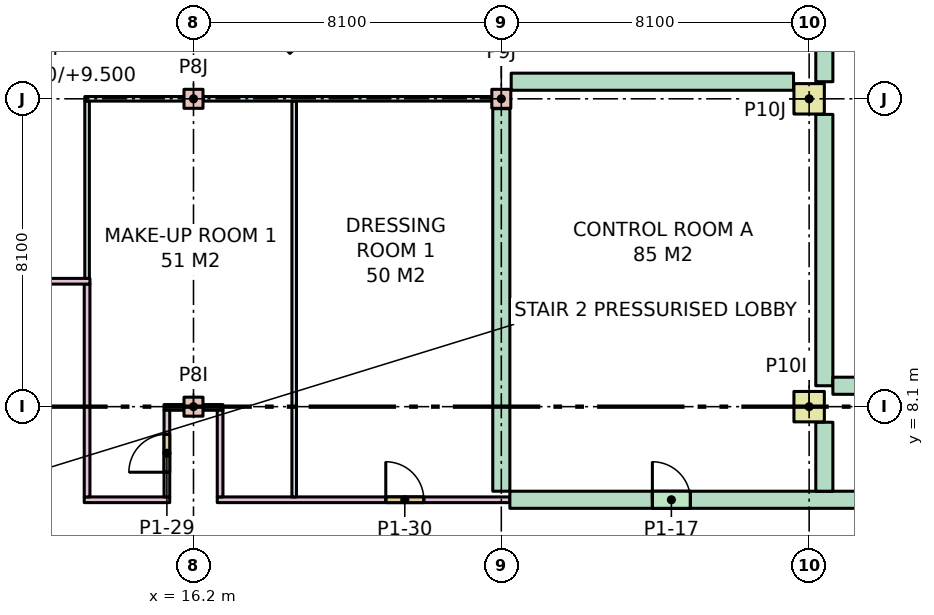
"""IFC4 building model, lengths in metres.
Left out: names, types, materials, properties, quantities, classifications, styles, units other than length and angle.
Written with IfcOpenShell. Run it as: python <this file> out.ifc"""

import sys

from ifc_helpers import new_model, si_unit, direction, frame, frame_2d, origin, origin_2d, place, context, subcontext, project, spatial, rectangle, extrude, element, fill, save


model = new_model("IFC4")
c1 = context("Model", 3, precision=1e-05, world=origin(), true_north=direction((0.0, 1.0)))
c2 = subcontext(c1, "Body", "Model", "MODEL_VIEW")
j1 = project(units=[si_unit("LENGTHUNIT", "METRE"), si_unit("PLANEANGLEUNIT", "RADIAN")], contexts=[c1])
p1 = place(None, origin())
s1 = spatial("IfcSite", under=j1, at=p1, CompositionType="ELEMENT")
p2 = place(p1, origin())
s2 = spatial("IfcBuilding", under=s1, at=p2, CompositionType="ELEMENT")
p3 = place(p2, frame((0.0, 0.0, 6.0)))
s3 = spatial("IfcBuildingStorey", under=s2, at=p3, CompositionType="ELEMENT", Elevation=6.0)
for number, where, z_axis, x_axis in (
    (1, (16.2, 8.1, 0.0), (0.0, 0.0, 1.0), (1.0, 0.0, 0.0)),
    (2, (16.2, 16.2, 0.0), (0.0, 0.0, 1.0), (1.0, 0.0, 0.0)),
    (3, (24.3, 16.2, 0.0), (0.0, 0.0, 1.0), (1.0, 0.0, 0.0)),
):
    element("IfcColumn", number, at=place(p3, frame(where, z_axis=z_axis, x_axis=x_axis)), inside=s3, PredefinedType="COLUMN", context=c2, shape_type="SweptSolid", body=[
        extrude(rectangle(XDim=0.5, YDim=0.5, at=origin_2d()), origin(), (0.0, 0.0, 1.0), 7.0),
    ])
for number, where, z_axis, x_axis in (
    (4, (32.4, 8.1, 0.0), (0.0, 0.0, 1.0), (1.0, 0.0, 0.0)),
    (5, (32.4, 16.2, 0.0), (0.0, 0.0, 1.0), (1.0, 0.0, 0.0)),
):
    element("IfcColumn", number, at=place(p3, frame(where, z_axis=z_axis, x_axis=x_axis)), inside=s3, PredefinedType="COLUMN", context=c2, shape_type="SweptSolid", body=[
        extrude(rectangle(XDim=0.8, YDim=0.8, at=origin_2d()), origin(), (0.0, 0.0, 1.0), 7.0),
    ])
p4 = place(p3, frame((18.738, 18.738, 0.0), z_axis=(0.0, 0.0, 1.0), x_axis=(-0.707106781187, 0.707106781187, 0.0)))
e6 = element("IfcColumn", 6, at=p4, inside=s3, PredefinedType="COLUMN", context=c2, shape_type="SweptSolid", body=[
    extrude(rectangle(XDim=1.9, YDim=1.9, at=origin_2d()), origin(), (0.0, 0.0, 1.0), 7.0),
])
p5 = place(p3, frame((24.3, 5.875, 0.0), z_axis=(0.0, 0.0, 1.0), x_axis=(0.0, 1.0, 0.0)))
e7 = element("IfcWall", 7, at=p5, inside=s3, PredefinedType="PARTITIONING", context=c2, shape_type="SweptSolid", body=[
    extrude(rectangle(XDim=10.065, YDim=0.45, at=frame_2d((5.032, 0.0))), origin(), (0.0, 0.0, 1.0), 6.68),
])
p6 = place(p3, frame((24.525, 5.65, 0.0), z_axis=(0.0, 0.0, 1.0), x_axis=(1.0, 0.0, 0.0)))
e8 = element("IfcWall", 8, at=p6, inside=s3, PredefinedType="PARTITIONING", context=c2, shape_type="SweptSolid", body=[
    extrude(rectangle(XDim=11.7, YDim=0.45, at=frame_2d((5.85, 0.0))), origin(), (0.0, 0.0, 1.0), 6.68),
])
p7 = place(p6, frame((9.65, 0.0, 0.0)))
e9 = element("IfcOpeningElement", 9, at=p7, cuts=e8, PredefinedType="OPENING", context=c2, shape_type="SweptSolid", body=[
    extrude(rectangle(XDim=1.0, YDim=2.1, at=frame_2d((0.5, 1.05))), frame((0.0, 0.235, 0.0), z_axis=(0.0, -1.0, 0.0), x_axis=(1.0, 0.0, 0.0)), (0.0, 0.0, 1.0), 0.47),
])
p8 = place(p6, frame((3.75, 0.0, 0.0)))
e10 = element("IfcOpeningElement", 10, at=p8, cuts=e8, PredefinedType="OPENING", context=c2, shape_type="SweptSolid", body=[
    extrude(rectangle(XDim=1.0, YDim=2.1, at=frame_2d((0.5, 1.05))), frame((0.0, 0.235, 0.0), z_axis=(0.0, -1.0, 0.0), x_axis=(1.0, 0.0, 0.0)), (0.0, 0.0, 1.0), 0.47),
])
p9 = place(p3, frame((32.8, 5.875, 0.0), z_axis=(0.0, 0.0, 1.0), x_axis=(0.0, 1.0, 0.0)))
e11 = element("IfcWall", 11, at=p9, inside=s3, PredefinedType="PARTITIONING", context=c2, shape_type="SweptSolid", body=[
    extrude(rectangle(XDim=1.815, YDim=0.45, at=frame_2d((0.907, 0.0))), origin(), (0.0, 0.0, 1.0), 6.68),
])
p10 = place(p3, frame((24.56, 16.65, 0.0), z_axis=(0.0, 0.0, 1.0), x_axis=(1.0, 0.0, 0.0)))
e12 = element("IfcWall", 12, at=p10, inside=s3, PredefinedType="PARTITIONING", context=c2, shape_type="SweptSolid", body=[
    extrude(rectangle(XDim=7.43, YDim=0.45, at=frame_2d((3.715, 0.0))), origin(), (0.0, 0.0, 1.0), 6.68),
])
p11 = place(p3, frame((32.8, 8.65, 0.0), z_axis=(0.0, 0.0, 1.0), x_axis=(0.0, 1.0, 0.0)))
e13 = element("IfcWall", 13, at=p11, inside=s3, PredefinedType="PARTITIONING", context=c2, shape_type="SweptSolid", body=[
    extrude(rectangle(XDim=7.14, YDim=0.45, at=frame_2d((3.57, 0.0))), origin(), (0.0, 0.0, 1.0), 6.68),
])
p12 = place(p3, frame((18.85, 5.725, 0.0), z_axis=(0.0, 0.0, 1.0), x_axis=(0.0, 1.0, 0.0)))
e14 = element("IfcWall", 14, at=p12, inside=s3, PredefinedType="PARTITIONING", context=c2, shape_type="SweptSolid", body=[
    extrude(rectangle(XDim=10.415, YDim=0.12, at=frame_2d((5.208, 0.0))), origin(), (0.0, 0.0, 1.0), 6.68),
])
p13 = place(p3, frame((13.325, 5.65, 0.0), z_axis=(0.0, 0.0, 1.0), x_axis=(1.0, 0.0, 0.0)))
e15 = element("IfcWall", 15, at=p13, inside=s3, PredefinedType="PARTITIONING", context=c2, shape_type="SweptSolid", body=[
    extrude(rectangle(XDim=2.25, YDim=0.15, at=frame_2d((1.125, 0.0))), origin(), (0.0, 0.0, 1.0), 6.68),
])
p14 = place(p3, frame((16.825, 5.65, 0.0), z_axis=(0.0, 0.0, 1.0), x_axis=(1.0, 0.0, 0.0)))
e16 = element("IfcWall", 16, at=p14, inside=s3, PredefinedType="PARTITIONING", context=c2, shape_type="SweptSolid", body=[
    extrude(rectangle(XDim=7.7, YDim=0.15, at=frame_2d((3.85, 0.0))), origin(), (0.0, 0.0, 1.0), 6.68),
])
p15 = place(p14, frame((4.435, 0.0, 0.0)))
e17 = element("IfcOpeningElement", 17, at=p15, cuts=e16, PredefinedType="OPENING", context=c2, shape_type="SweptSolid", body=[
    extrude(rectangle(XDim=1.0, YDim=2.1, at=frame_2d((0.5, 1.05))), frame((0.0, 0.085, 0.0), z_axis=(0.0, -1.0, 0.0), x_axis=(1.0, 0.0, 0.0)), (0.0, 0.0, 1.0), 0.17),
])
p16 = place(p3, frame((15.425, 8.08, 0.0), z_axis=(0.0, 0.0, 1.0), x_axis=(1.0, 0.0, 0.0)))
e18 = element("IfcWall", 18, at=p16, inside=s3, PredefinedType="PARTITIONING", context=c2, shape_type="SweptSolid", body=[
    extrude(rectangle(XDim=0.515, YDim=0.15, at=frame_2d((0.257, 0.0))), origin(), (0.0, 0.0, 1.0), 6.68),
])
p17 = place(p3, frame((16.46, 8.08, 0.0), z_axis=(0.0, 0.0, 1.0), x_axis=(1.0, 0.0, 0.0)))
e19 = element("IfcWall", 19, at=p17, inside=s3, PredefinedType="PARTITIONING", context=c2, shape_type="SweptSolid", body=[
    extrude(rectangle(XDim=0.515, YDim=0.15, at=frame_2d((0.258, 0.0))), origin(), (0.0, 0.0, 1.0), 6.68),
])
p18 = place(p3, frame((15.5, 5.725, 0.0), z_axis=(0.0, 0.0, 1.0), x_axis=(0.0, 1.0, 0.0)))
e20 = element("IfcWall", 20, at=p18, inside=s3, PredefinedType="PARTITIONING", context=c2, shape_type="SweptSolid", body=[
    extrude(rectangle(XDim=2.28, YDim=0.15, at=frame_2d((1.14, 0.0))), origin(), (0.0, 0.0, 1.0), 6.68),
])
p19 = place(p18, frame((0.65, 0.0, 0.0)))
e21 = element("IfcOpeningElement", 21, at=p19, cuts=e20, PredefinedType="OPENING", context=c2, shape_type="SweptSolid", body=[
    extrude(rectangle(XDim=1.0, YDim=2.1, at=frame_2d((0.5, 1.05))), frame((0.0, 0.085, 0.0), z_axis=(0.0, -1.0, 0.0), x_axis=(1.0, 0.0, 0.0)), (0.0, 0.0, 1.0), 0.17),
])
p20 = place(p3, frame((16.9, 5.725, 0.0), z_axis=(0.0, 0.0, 1.0), x_axis=(0.0, 1.0, 0.0)))
e22 = element("IfcWall", 22, at=p20, inside=s3, PredefinedType="PARTITIONING", context=c2, shape_type="SweptSolid", body=[
    extrude(rectangle(XDim=2.28, YDim=0.15, at=frame_2d((1.14, 0.0))), origin(), (0.0, 0.0, 1.0), 6.68),
])
p21 = place(p3, frame((33.025, 8.65, 0.0), z_axis=(0.0, 0.0, 1.0), x_axis=(1.0, 0.0, 0.0)))
e23 = element("IfcWall", 23, at=p21, inside=s3, PredefinedType="PARTITIONING", context=c2, shape_type="SweptSolid", body=[
    extrude(rectangle(XDim=11.35, YDim=0.45, at=frame_2d((5.675, 0.0))), origin(), (0.0, 0.0, 1.0), 6.68),
])
p22 = place(p21, frame((1.15, 0.0, 0.0)))
e24 = element("IfcOpeningElement", 24, at=p22, cuts=e23, PredefinedType="OPENING", context=c2, shape_type="SweptSolid", body=[
    extrude(rectangle(XDim=1.0, YDim=2.1, at=frame_2d((0.5, 1.05))), frame((0.0, 0.235, 0.0), z_axis=(0.0, -1.0, 0.0), x_axis=(1.0, 0.0, 0.0)), (0.0, 0.0, 1.0), 0.47),
])
p23 = place(p21, frame((9.45, 0.0, 0.0)))
e25 = element("IfcOpeningElement", 25, at=p23, cuts=e23, PredefinedType="OPENING", context=c2, shape_type="SweptSolid", body=[
    extrude(rectangle(XDim=1.0, YDim=2.1, at=frame_2d((0.5, 1.05))), frame((0.0, 0.235, 0.0), z_axis=(0.0, -1.0, 0.0), x_axis=(1.0, 0.0, 0.0)), (0.0, 0.0, 1.0), 0.47),
])
p24 = place(p3, frame((13.34, 16.2, 0.0), z_axis=(0.0, 0.0, 1.0), x_axis=(1.0, 0.0, 0.0)))
e26 = element("IfcWall", 26, at=p24, inside=s3, PredefinedType="PARTITIONING", context=c2, shape_type="SweptSolid", body=[
    extrude(rectangle(XDim=2.6, YDim=0.12, at=frame_2d((1.3, 0.0))), origin(), (0.0, 0.0, 1.0), 6.68),
])
p25 = place(p3, frame((16.46, 16.2, 0.0), z_axis=(0.0, 0.0, 1.0), x_axis=(1.0, 0.0, 0.0)))
e27 = element("IfcWall", 27, at=p25, inside=s3, PredefinedType="PARTITIONING", context=c2, shape_type="SweptSolid", body=[
    extrude(rectangle(XDim=7.58, YDim=0.12, at=frame_2d((3.79, 0.0))), origin(), (0.0, 0.0, 1.0), 6.68),
])
p26 = place(p3, frame((13.4, 11.475, 0.0), z_axis=(0.0, 0.0, 1.0), x_axis=(0.0, 1.0, 0.0)))
e28 = element("IfcWall", 28, at=p26, inside=s3, PredefinedType="PARTITIONING", context=c2, shape_type="SweptSolid", body=[
    extrude(rectangle(XDim=4.665, YDim=0.12, at=frame_2d((2.333, 0.0))), origin(), (0.0, 0.0, 1.0), 6.68),
])
p27 = place(p3, frame((13.4, 5.725, 0.0), z_axis=(0.0, 0.0, 1.0), x_axis=(0.0, 1.0, 0.0)))
e29 = element("IfcWall", 29, at=p27, inside=s3, PredefinedType="PARTITIONING", context=c2, shape_type="SweptSolid", body=[
    extrude(rectangle(XDim=5.6, YDim=0.15, at=frame_2d((2.8, 0.0))), origin(), (0.0, 0.0, 1.0), 6.68),
])
p28 = place(p3, frame((9.375, 11.4, 0.0), z_axis=(0.0, 0.0, 1.0), x_axis=(1.0, 0.0, 0.0)))
e30 = element("IfcWall", 30, at=p28, inside=s3, PredefinedType="PARTITIONING", context=c2, shape_type="SweptSolid", body=[
    extrude(rectangle(XDim=4.1, YDim=0.15, at=frame_2d((2.05, 0.0))), origin(), (0.0, 0.0, 1.0), 6.68),
])
p29 = place(p28, frame((1.55, 0.0, 0.0)))
e31 = element("IfcOpeningElement", 31, at=p29, cuts=e30, PredefinedType="OPENING", context=c2, shape_type="SweptSolid", body=[
    extrude(rectangle(XDim=1.0, YDim=2.1, at=frame_2d((0.5, 1.05))), frame((0.0, 0.085, 0.0), z_axis=(0.0, -1.0, 0.0), x_axis=(1.0, 0.0, 0.0)), (0.0, 0.0, 1.0), 0.17),
])
p30 = place(p3, frame((32.8, 16.65, 0.0), z_axis=(0.0, 0.0, 1.0), x_axis=(0.0, 1.0, 0.0)))
e32 = element("IfcWall", 32, at=p30, inside=s3, PredefinedType="PARTITIONING", context=c2, shape_type="SweptSolid", body=[
    extrude(rectangle(XDim=7.24, YDim=0.45, at=frame_2d((3.62, 0.0))), origin(), (0.0, 0.0, 1.0), 6.68),
])
p31 = place(p8, origin())
e33 = element("IfcDoor", 33, at=p31, inside=s3, OperationType="SINGLE_SWING_LEFT", PredefinedType="DOOR", context=c2, shape_type="SweptSolid", body=[
    extrude(rectangle(XDim=1.0, YDim=2.1, at=frame_2d((0.5, 1.05))), frame((0.0, 0.025, 0.0), z_axis=(0.0, -1.0, 0.0), x_axis=(1.0, 0.0, 0.0)), (0.0, 0.0, 1.0), 0.05),
])
fill(e10, e33)
p32 = place(p19, origin())
e34 = element("IfcDoor", 34, at=p32, inside=s3, OperationType="SINGLE_SWING_LEFT", PredefinedType="DOOR", context=c2, shape_type="SweptSolid", body=[
    extrude(rectangle(XDim=1.0, YDim=2.1, at=frame_2d((0.5, 1.05))), frame((0.0, 0.025, 0.0), z_axis=(0.0, -1.0, 0.0), x_axis=(1.0, 0.0, 0.0)), (0.0, 0.0, 1.0), 0.05),
])
fill(e21, e34)
p33 = place(p15, origin())
e35 = element("IfcDoor", 35, at=p33, inside=s3, OperationType="SINGLE_SWING_LEFT", PredefinedType="DOOR", context=c2, shape_type="SweptSolid", body=[
    extrude(rectangle(XDim=1.0, YDim=2.1, at=frame_2d((0.5, 1.05))), frame((0.0, 0.025, 0.0), z_axis=(0.0, -1.0, 0.0), x_axis=(1.0, 0.0, 0.0)), (0.0, 0.0, 1.0), 0.05),
])
fill(e17, e35)
save(model, sys.argv[1])
